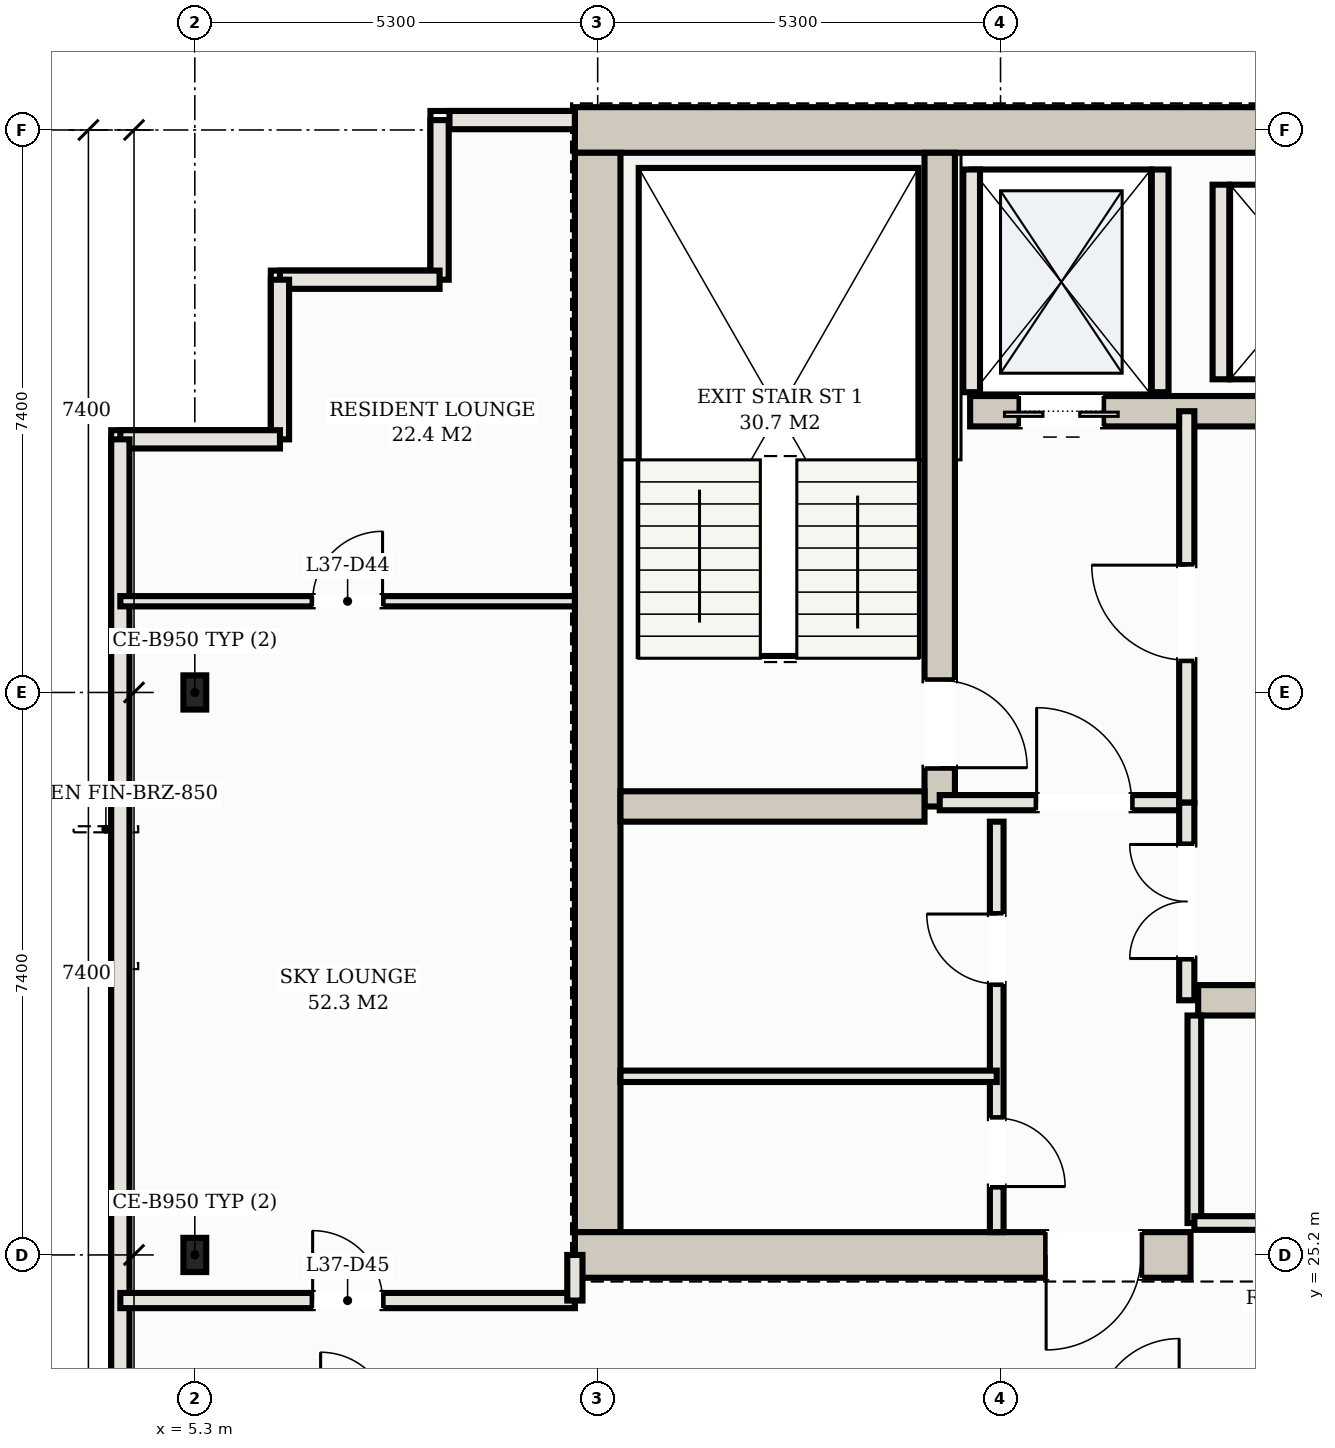
"""IFC4 building model, lengths in metres.
Left out: names, types, materials, properties, quantities, classifications, styles, units other than length and angle.
Written with IfcOpenShell. Run it as: python <this file> out.ifc"""

import sys

from ifc_helpers import new_model, si_unit, direction, frame, frame_2d, origin, origin_2d, place, context, subcontext, project, spatial, rectangle, hollow_rectangle, extrude, element, fill, save


model = new_model("IFC4")
c1 = context("Model", 3, precision=1e-05, world=origin(), true_north=direction((0.0, 1.0)))
c2 = subcontext(c1, "Body", "Model", "MODEL_VIEW")
j1 = project(units=[si_unit("LENGTHUNIT", "METRE"), si_unit("PLANEANGLEUNIT", "RADIAN")], contexts=[c1])
p1 = place(None, origin())
s1 = spatial("IfcSite", under=j1, at=p1, CompositionType="ELEMENT")
p2 = place(p1, origin())
s2 = spatial("IfcBuilding", under=s1, at=p2, CompositionType="ELEMENT")
p3 = place(p2, frame((0.0, 0.0, 139.2)))
s3 = spatial("IfcBuildingStorey", under=s2, at=p3, CompositionType="ELEMENT", Elevation=139.2)
p4 = place(p3, frame((10.3, 40.0, 0.0), z_axis=(0.0, 0.0, 1.0), x_axis=(1.0, 0.0, 0.0)))
e1 = element("IfcWall", 1, at=p4, inside=s3, PredefinedType="SHEAR", context=c2, shape_type="SweptSolid", body=[
    extrude(rectangle(XDim=32.4, YDim=0.6, at=frame_2d((16.2, 0.0))), origin(), (0.0, 0.0, 1.0), 3.1),
])
p5 = place(p3, frame((10.6, 25.5, 0.0), z_axis=(0.0, 0.0, 1.0), x_axis=(0.0, 1.0, 0.0)))
e2 = element("IfcWall", 2, at=p5, inside=s3, PredefinedType="SHEAR", context=c2, shape_type="SweptSolid", body=[
    extrude(rectangle(XDim=14.2, YDim=0.6, at=frame_2d((7.1, 0.0))), origin(), (0.0, 0.0, 1.0), 3.1),
])
p6 = place(p3, frame((10.3, 25.2, 0.0), z_axis=(0.0, 0.0, 1.0), x_axis=(1.0, 0.0, 0.0)))
e3 = element("IfcWall", 3, at=p6, inside=s3, PredefinedType="SHEAR", context=c2, shape_type="SweptSolid", body=[
    extrude(rectangle(XDim=8.1, YDim=0.6, at=frame_2d((4.05, 0.0))), origin(), (0.0, 0.0, 1.0), 3.1),
])
p7 = place(p6, frame((6.2, 0.0, 0.0)))
e4 = element("IfcOpeningElement", 4, at=p7, cuts=e3, PredefinedType="OPENING", context=c2, shape_type="SweptSolid", body=[
    extrude(rectangle(XDim=1.25, YDim=2.2, at=frame_2d((0.625, 1.1))), frame((0.0, 0.31, 0.0), z_axis=(0.0, -1.0, 0.0), x_axis=(1.0, 0.0, 0.0)), (0.0, 0.0, 1.0), 0.62),
])
p8 = place(p3, frame((15.1, 31.1, 0.0), z_axis=(0.0, 0.0, 1.0), x_axis=(0.0, 1.0, 0.0)))
e5 = element("IfcWall", 5, at=p8, inside=s3, PredefinedType="SHEAR", context=c2, shape_type="SweptSolid", body=[
    extrude(rectangle(XDim=8.6, YDim=0.4, at=frame_2d((4.3, 0.0))), origin(), (0.0, 0.0, 1.0), 3.1),
])
p9 = place(p8, frame((0.51, 0.0, 0.0)))
e6 = element("IfcOpeningElement", 6, at=p9, cuts=e5, PredefinedType="OPENING", context=c2, shape_type="SweptSolid", body=[
    extrude(rectangle(XDim=1.15, YDim=2.2, at=frame_2d((0.575, 1.1))), frame((0.0, 0.21, 0.0), z_axis=(0.0, -1.0, 0.0), x_axis=(1.0, 0.0, 0.0)), (0.0, 0.0, 1.0), 0.42),
])
p10 = place(p3, frame((10.9, 31.1, 0.0), z_axis=(0.0, 0.0, 1.0), x_axis=(1.0, 0.0, 0.0)))
e7 = element("IfcWall", 7, at=p10, inside=s3, PredefinedType="SHEAR", context=c2, shape_type="SweptSolid", body=[
    extrude(rectangle(XDim=4.0, YDim=0.4, at=frame_2d((2.0, 0.0))), origin(), (0.0, 0.0, 1.0), 3.1),
])
p11 = place(p3, frame((15.5, 36.3, 0.0), z_axis=(0.0, 0.0, 1.0), x_axis=(1.0, 0.0, 0.0)))
e8 = element("IfcWall", 8, at=p11, inside=s3, PredefinedType="SHEAR", context=c2, shape_type="SweptSolid", body=[
    extrude(rectangle(XDim=22.0, YDim=0.4, at=frame_2d((11.0, 0.0))), origin(), (0.0, 0.0, 1.0), 3.1),
])
p12 = place(p11, frame((0.65, 0.0, 0.0)))
e9 = element("IfcOpeningElement", 9, at=p12, cuts=e8, PredefinedType="OPENING", context=c2, shape_type="SweptSolid", body=[
    extrude(rectangle(XDim=1.1, YDim=2.15, at=frame_2d((0.55, 1.075))), frame((0.0, 0.21, 0.0), z_axis=(0.0, -1.0, 0.0), x_axis=(1.0, 0.0, 0.0)), (0.0, 0.0, 1.0), 0.42),
])
p13 = place(p11, frame((20.25, 0.0, 0.0)))
e10 = element("IfcOpeningElement", 10, at=p13, cuts=e8, PredefinedType="OPENING", context=c2, shape_type="SweptSolid", body=[
    extrude(rectangle(XDim=1.1, YDim=2.15, at=frame_2d((0.55, 1.075))), frame((0.0, 0.21, 0.0), z_axis=(0.0, -1.0, 0.0), x_axis=(1.0, 0.0, 0.0)), (0.0, 0.0, 1.0), 0.42),
])
p14 = place(p11, frame((17.05, 0.0, 0.0)))
e11 = element("IfcOpeningElement", 11, at=p14, cuts=e8, PredefinedType="OPENING", context=c2, shape_type="SweptSolid", body=[
    extrude(rectangle(XDim=1.3, YDim=2.2, at=frame_2d((0.65, 1.1))), frame((0.0, 0.21, 0.0), z_axis=(0.0, -1.0, 0.0), x_axis=(1.0, 0.0, 0.0)), (0.0, 0.0, 1.0), 0.42),
])
p15 = place(p3, frame((18.5, 28.55, 0.0), z_axis=(0.0, 0.0, 1.0), x_axis=(1.0, 0.0, 0.0)))
e12 = element("IfcWall", 12, at=p15, inside=s3, PredefinedType="SHEAR", context=c2, shape_type="SweptSolid", body=[
    extrude(rectangle(XDim=16.0, YDim=0.4, at=frame_2d((8.0, 0.0))), origin(), (0.0, 0.0, 1.0), 3.1),
])
p16 = place(p15, frame((8.95, 0.0, 0.0)))
e13 = element("IfcOpeningElement", 13, at=p16, cuts=e12, PredefinedType="OPENING", context=c2, shape_type="SweptSolid", body=[
    extrude(rectangle(XDim=1.1, YDim=2.15, at=frame_2d((0.55, 1.075))), frame((0.0, 0.21, 0.0), z_axis=(0.0, -1.0, 0.0), x_axis=(1.0, 0.0, 0.0)), (0.0, 0.0, 1.0), 0.42),
])
p17 = place(p15, frame((11.55, 0.0, 0.0)))
e14 = element("IfcOpeningElement", 14, at=p17, cuts=e12, PredefinedType="OPENING", context=c2, shape_type="SweptSolid", body=[
    extrude(rectangle(XDim=1.1, YDim=2.15, at=frame_2d((0.55, 1.075))), frame((0.0, 0.21, 0.0), z_axis=(0.0, -1.0, 0.0), x_axis=(1.0, 0.0, 0.0)), (0.0, 0.0, 1.0), 0.42),
])
p18 = place(p15, frame((14.15, 0.0, 0.0)))
e15 = element("IfcOpeningElement", 15, at=p18, cuts=e12, PredefinedType="OPENING", context=c2, shape_type="SweptSolid", body=[
    extrude(rectangle(XDim=1.1, YDim=2.15, at=frame_2d((0.55, 1.075))), frame((0.0, 0.21, 0.0), z_axis=(0.0, -1.0, 0.0), x_axis=(1.0, 0.0, 0.0)), (0.0, 0.0, 1.0), 0.42),
])
for number, where, z_axis, x_axis in (
    (16, (5.3, 25.2, 0.0), (0.0, 0.0, 1.0), (1.0, 0.0, 0.0)),
    (17, (5.3, 32.6, 0.0), (0.0, 0.0, 1.0), (1.0, 0.0, 0.0)),
):
    element("IfcColumn", number, at=place(p3, frame(where, z_axis=z_axis, x_axis=x_axis)), inside=s3, PredefinedType="COLUMN", context=c2, shape_type="SweptSolid", body=[
        extrude(hollow_rectangle(XDim=0.3, YDim=0.45, WallThickness=0.016, at=origin_2d()), origin(), (0.0, 0.0, 1.0), 3.3),
    ])
for number, where, z_axis, x_axis in (
    (18, (15.52, 36.55, 0.0), (0.0, 0.0, 1.0), (0.0, 1.0, 0.0)),
    (19, (18.0, 36.55, 0.0), (0.0, 0.0, 1.0), (0.0, 1.0, 0.0)),
):
    element("IfcWall", number, at=place(p3, frame(where, z_axis=z_axis, x_axis=x_axis)), inside=s3, PredefinedType="SOLIDWALL", context=c2, shape_type="SweptSolid", body=[
        extrude(rectangle(XDim=2.93, YDim=0.22, at=frame_2d((1.465, 0.0))), origin(), (0.0, 0.0, 1.0), 3.1),
    ])
p19 = place(p3, frame((18.8, 36.72, 0.0), z_axis=(0.0, 0.0, 1.0), x_axis=(0.0, 1.0, 0.0)))
e20 = element("IfcWall", 20, at=p19, inside=s3, PredefinedType="SOLIDWALL", context=c2, shape_type="SweptSolid", body=[
    extrude(rectangle(XDim=2.56, YDim=0.22, at=frame_2d((1.28, 0.0))), origin(), (0.0, 0.0, 1.0), 3.1),
])
p20 = place(p3, frame((10.3, 40.13, 0.0), z_axis=(0.0, 0.0, 1.0), x_axis=(-1.0, 0.0, 0.0)))
e21 = element("IfcWall", 21, at=p20, inside=s3, PredefinedType="SOLIDWALL", context=c2, shape_type="SweptSolid", body=[
    extrude(rectangle(XDim=1.65, YDim=0.24, at=frame_2d((0.825, 0.0))), origin(), (0.0, 0.0, 1.0), 3.1),
])
p21 = place(p3, frame((8.52, 40.13, 0.0), z_axis=(0.0, 0.0, 1.0), x_axis=(0.0, -1.0, 0.0)))
e22 = element("IfcWall", 22, at=p21, inside=s3, PredefinedType="SOLIDWALL", context=c2, shape_type="SweptSolid", body=[
    extrude(rectangle(XDim=2.1, YDim=0.24, at=frame_2d((1.05, 0.0))), origin(), (0.0, 0.0, 1.0), 3.1),
])
for number, where, z_axis, x_axis in (
    (23, (8.52, 38.03, 0.0), (0.0, 0.0, 1.0), (-1.0, 0.0, 0.0)),
    (24, (6.42, 38.03, 0.0), (0.0, 0.0, 1.0), (0.0, -1.0, 0.0)),
):
    element("IfcWall", number, at=place(p3, frame(where, z_axis=z_axis, x_axis=x_axis)), inside=s3, PredefinedType="SOLIDWALL", context=c2, shape_type="SweptSolid", body=[
        extrude(rectangle(XDim=2.1, YDim=0.24, at=frame_2d((1.05, 0.0))), origin(), (0.0, 0.0, 1.0), 3.1),
    ])
p22 = place(p3, frame((6.42, 35.93, 0.0), z_axis=(0.0, 0.0, 1.0), x_axis=(-1.0, 0.0, 0.0)))
e25 = element("IfcWall", 25, at=p22, inside=s3, PredefinedType="SOLIDWALL", context=c2, shape_type="SweptSolid", body=[
    extrude(rectangle(XDim=2.1, YDim=0.24, at=frame_2d((1.05, 0.0))), origin(), (0.0, 0.0, 1.0), 3.1),
])
p23 = place(p3, frame((4.32, 35.93, 0.0), z_axis=(0.0, 0.0, 1.0), x_axis=(0.0, -1.0, 0.0)))
e26 = element("IfcWall", 26, at=p23, inside=s3, PredefinedType="SOLIDWALL", context=c2, shape_type="SweptSolid", body=[
    extrude(rectangle(XDim=27.41, YDim=0.24, at=frame_2d((13.705, 0.0))), origin(), (0.0, 0.0, 1.0), 3.1),
])
p24 = place(p3, frame((15.1, 31.15, 0.0), z_axis=(0.0, 0.0, 1.0), x_axis=(1.0, 0.0, 0.0)))
e27 = element("IfcWall", 27, at=p24, inside=s3, PredefinedType="PARTITIONING", context=c2, shape_type="SweptSolid", body=[
    extrude(rectangle(XDim=3.25, YDim=0.2, at=frame_2d((1.625, 0.0))), origin(), (0.0, 0.0, 1.0), 2.38),
])
p25 = place(p24, frame((1.275, 0.0, 0.0)))
e28 = element("IfcOpeningElement", 28, at=p25, cuts=e27, PredefinedType="OPENING", context=c2, shape_type="SweptSolid", body=[
    extrude(rectangle(XDim=1.25, YDim=2.2, at=frame_2d((0.625, 1.1))), frame((0.0, 0.11, 0.0), z_axis=(0.0, -1.0, 0.0), x_axis=(1.0, 0.0, 0.0)), (0.0, 0.0, 1.0), 0.22),
])
p26 = place(p3, frame((18.35, 31.15, 0.0), z_axis=(0.0, 0.0, 1.0), x_axis=(0.0, 1.0, 0.0)))
e29 = element("IfcWall", 29, at=p26, inside=s3, PredefinedType="PARTITIONING", context=c2, shape_type="SweptSolid", body=[
    extrude(rectangle(XDim=5.15, YDim=0.2, at=frame_2d((2.575, 0.0))), origin(), (0.0, 0.0, 1.0), 2.38),
])
p27 = place(p26, frame((1.875, 0.0, 0.0)))
e30 = element("IfcOpeningElement", 30, at=p27, cuts=e29, PredefinedType="OPENING", context=c2, shape_type="SweptSolid", body=[
    extrude(rectangle(XDim=1.25, YDim=2.2, at=frame_2d((0.625, 1.1))), frame((0.0, 0.11, 0.0), z_axis=(0.0, -1.0, 0.0), x_axis=(1.0, 0.0, 0.0)), (0.0, 0.0, 1.0), 0.22),
])
p28 = place(p3, frame((15.85, 25.5, 0.0), z_axis=(0.0, 0.0, 1.0), x_axis=(0.0, 1.0, 0.0)))
e31 = element("IfcWall", 31, at=p28, inside=s3, PredefinedType="PARTITIONING", context=c2, shape_type="SweptSolid", body=[
    extrude(rectangle(XDim=5.4, YDim=0.18, at=frame_2d((2.7, 0.0))), origin(), (0.0, 0.0, 1.0), 2.38),
])
p29 = place(p28, frame((0.6, 0.0, 0.0)))
e32 = element("IfcOpeningElement", 32, at=p29, cuts=e31, PredefinedType="OPENING", context=c2, shape_type="SweptSolid", body=[
    extrude(rectangle(XDim=0.9, YDim=2.15, at=frame_2d((0.45, 1.075))), frame((0.0, 0.1, 0.0), z_axis=(0.0, -1.0, 0.0), x_axis=(1.0, 0.0, 0.0)), (0.0, 0.0, 1.0), 0.2),
])
p30 = place(p28, frame((3.265, 0.0, 0.0)))
e33 = element("IfcOpeningElement", 33, at=p30, cuts=e31, PredefinedType="OPENING", context=c2, shape_type="SweptSolid", body=[
    extrude(rectangle(XDim=0.92, YDim=2.15, at=frame_2d((0.46, 1.075))), frame((0.0, 0.1, 0.0), z_axis=(0.0, -1.0, 0.0), x_axis=(1.0, 0.0, 0.0)), (0.0, 0.0, 1.0), 0.2),
])
p31 = place(p3, frame((10.9, 27.55, 0.0), z_axis=(0.0, 0.0, 1.0), x_axis=(1.0, 0.0, 0.0)))
e34 = element("IfcWall", 34, at=p31, inside=s3, PredefinedType="PARTITIONING", context=c2, shape_type="SweptSolid", body=[
    extrude(rectangle(XDim=4.95, YDim=0.15, at=frame_2d((2.475, 0.0))), origin(), (0.0, 0.0, 1.0), 2.38),
])
p32 = place(p3, frame((18.35, 28.55, 0.0), z_axis=(0.0, 0.0, 1.0), x_axis=(0.0, 1.0, 0.0)))
e35 = element("IfcWall", 35, at=p32, inside=s3, PredefinedType="PARTITIONING", context=c2, shape_type="SweptSolid", body=[
    extrude(rectangle(XDim=2.6, YDim=0.2, at=frame_2d((1.3, 0.0))), origin(), (0.0, 0.0, 1.0), 2.38),
])
p33 = place(p32, frame((0.55, 0.0, 0.0)))
e36 = element("IfcOpeningElement", 36, at=p33, cuts=e35, PredefinedType="OPENING", context=c2, shape_type="SweptSolid", body=[
    extrude(rectangle(XDim=1.5, YDim=2.25, at=frame_2d((0.75, 1.125))), frame((0.0, 0.11, 0.0), z_axis=(0.0, -1.0, 0.0), x_axis=(1.0, 0.0, 0.0)), (0.0, 0.0, 1.0), 0.22),
])
p34 = place(p3, frame((18.45, 25.62, 0.0), z_axis=(0.0, 0.0, 1.0), x_axis=(0.0, 1.0, 0.0)))
e37 = element("IfcWall", 37, at=p34, inside=s3, PredefinedType="PARTITIONING", context=c2, shape_type="SweptSolid", body=[
    extrude(rectangle(XDim=2.73, YDim=0.18, at=frame_2d((1.365, 0.0))), origin(), (0.0, 0.0, 1.0), 2.38),
])
p35 = place(p3, frame((18.45, 25.62, 0.0), z_axis=(0.0, 0.0, 1.0), x_axis=(1.0, 0.0, 0.0)))
e38 = element("IfcWall", 38, at=p35, inside=s3, PredefinedType="PARTITIONING", context=c2, shape_type="SweptSolid", body=[
    extrude(rectangle(XDim=7.9, YDim=0.18, at=frame_2d((3.95, 0.0))), origin(), (0.0, 0.0, 1.0), 2.38),
])
p36 = place(p35, frame((3.34, 0.0, 0.0)))
e39 = element("IfcOpeningElement", 39, at=p36, cuts=e38, PredefinedType="OPENING", context=c2, shape_type="SweptSolid", body=[
    extrude(rectangle(XDim=0.92, YDim=2.15, at=frame_2d((0.46, 1.075))), frame((0.0, 0.1, 0.0), z_axis=(0.0, -1.0, 0.0), x_axis=(1.0, 0.0, 0.0)), (0.0, 0.0, 1.0), 0.2),
])
p37 = place(p3, frame((4.32, 24.6, 0.0), z_axis=(0.0, 0.0, 1.0), x_axis=(1.0, 0.0, 0.0)))
e40 = element("IfcWall", 40, at=p37, inside=s3, PredefinedType="PARTITIONING", context=c2, shape_type="SweptSolid", body=[
    extrude(rectangle(XDim=5.98, YDim=0.2, at=frame_2d((2.99, 0.0))), origin(), (0.0, 0.0, 1.0), 2.38),
])
p38 = place(p37, frame((2.53, 0.0, 0.0)))
e41 = element("IfcOpeningElement", 41, at=p38, cuts=e40, PredefinedType="OPENING", context=c2, shape_type="SweptSolid", body=[
    extrude(rectangle(XDim=0.92, YDim=2.15, at=frame_2d((0.46, 1.075))), frame((0.0, 0.11, 0.0), z_axis=(0.0, -1.0, 0.0), x_axis=(1.0, 0.0, 0.0)), (0.0, 0.0, 1.0), 0.22),
])
p39 = place(p3, frame((10.3, 24.6, 0.0), z_axis=(0.0, 0.0, 1.0), x_axis=(0.0, 1.0, 0.0)))
e42 = element("IfcWall", 42, at=p39, inside=s3, PredefinedType="PARTITIONING", context=c2, shape_type="SweptSolid", body=[
    extrude(rectangle(XDim=0.6, YDim=0.2, at=frame_2d((0.3, 0.0))), origin(), (0.0, 0.0, 1.0), 2.38),
])
p40 = place(p3, frame((4.32, 33.8, 0.0), z_axis=(0.0, 0.0, 1.0), x_axis=(1.0, 0.0, 0.0)))
e43 = element("IfcWall", 43, at=p40, inside=s3, PredefinedType="PARTITIONING", context=c2, shape_type="SweptSolid", body=[
    extrude(rectangle(XDim=5.98, YDim=0.135, at=frame_2d((2.99, 0.0))), origin(), (0.0, 0.0, 1.0), 2.38),
])
p41 = place(p40, frame((2.53, 0.0, 0.0)))
e44 = element("IfcOpeningElement", 44, at=p41, cuts=e43, PredefinedType="OPENING", context=c2, shape_type="SweptSolid", body=[
    extrude(rectangle(XDim=0.92, YDim=2.15, at=frame_2d((0.46, 1.075))), frame((0.0, 0.078, 0.0), z_axis=(0.0, -1.0, 0.0), x_axis=(1.0, 0.0, 0.0)), (0.0, 0.0, 1.0), 0.155),
])
p42 = place(p12, frame((1.1, 0.0, 0.0), z_axis=(0.0, 0.0, 1.0), x_axis=(-1.0, 0.0, 0.0)))
e45 = element("IfcDoor", 45, at=p42, inside=s3, OperationType="DOUBLE_DOOR_SLIDING", PredefinedType="DOOR", context=c2, shape_type="SweptSolid", body=[
    extrude(rectangle(XDim=1.1, YDim=2.15, at=frame_2d((0.55, 1.075))), frame((0.0, 0.025, 0.0), z_axis=(0.0, -1.0, 0.0), x_axis=(1.0, 0.0, 0.0)), (0.0, 0.0, 1.0), 0.05),
])
fill(e9, e45)
p43 = place(p7, frame((1.25, 0.0, 0.0), z_axis=(0.0, 0.0, 1.0), x_axis=(-1.0, 0.0, 0.0)))
e46 = element("IfcDoor", 46, at=p43, inside=s3, OperationType="SINGLE_SWING_RIGHT", PredefinedType="DOOR", context=c2, shape_type="SweptSolid", body=[
    extrude(rectangle(XDim=1.25, YDim=2.2, at=frame_2d((0.625, 1.1))), frame((0.0, 0.025, 0.0), z_axis=(0.0, -1.0, 0.0), x_axis=(1.0, 0.0, 0.0)), (0.0, 0.0, 1.0), 0.05),
])
fill(e4, e46)
p44 = place(p25, origin())
e47 = element("IfcDoor", 47, at=p44, inside=s3, OperationType="SINGLE_SWING_LEFT", PredefinedType="DOOR", context=c2, shape_type="SweptSolid", body=[
    extrude(rectangle(XDim=1.25, YDim=2.2, at=frame_2d((0.625, 1.1))), frame((0.0, 0.025, 0.0), z_axis=(0.0, -1.0, 0.0), x_axis=(1.0, 0.0, 0.0)), (0.0, 0.0, 1.0), 0.05),
])
fill(e28, e47)
p45 = place(p27, origin())
e48 = element("IfcDoor", 48, at=p45, inside=s3, OperationType="SINGLE_SWING_RIGHT", PredefinedType="DOOR", context=c2, shape_type="SweptSolid", body=[
    extrude(rectangle(XDim=1.25, YDim=2.2, at=frame_2d((0.625, 1.1))), frame((0.0, 0.025, 0.0), z_axis=(0.0, -1.0, 0.0), x_axis=(1.0, 0.0, 0.0)), (0.0, 0.0, 1.0), 0.05),
])
fill(e30, e48)
p46 = place(p9, frame((1.15, 0.0, 0.0), z_axis=(0.0, 0.0, 1.0), x_axis=(-1.0, 0.0, 0.0)))
e49 = element("IfcDoor", 49, at=p46, inside=s3, OperationType="SINGLE_SWING_RIGHT", PredefinedType="DOOR", context=c2, shape_type="SweptSolid", body=[
    extrude(rectangle(XDim=1.15, YDim=2.2, at=frame_2d((0.575, 1.1))), frame((0.0, 0.025, 0.0), z_axis=(0.0, -1.0, 0.0), x_axis=(1.0, 0.0, 0.0)), (0.0, 0.0, 1.0), 0.05),
])
fill(e6, e49)
p47 = place(p29, frame((0.9, 0.0, 0.0), z_axis=(0.0, 0.0, 1.0), x_axis=(-1.0, 0.0, 0.0)))
e50 = element("IfcDoor", 50, at=p47, inside=s3, OperationType="SINGLE_SWING_RIGHT", PredefinedType="DOOR", context=c2, shape_type="SweptSolid", body=[
    extrude(rectangle(XDim=0.9, YDim=2.15, at=frame_2d((0.45, 1.075))), frame((0.0, 0.025, 0.0), z_axis=(0.0, -1.0, 0.0), x_axis=(1.0, 0.0, 0.0)), (0.0, 0.0, 1.0), 0.05),
])
fill(e32, e50)
p48 = place(p30, origin())
e51 = element("IfcDoor", 51, at=p48, inside=s3, OperationType="SINGLE_SWING_RIGHT", PredefinedType="DOOR", context=c2, shape_type="SweptSolid", body=[
    extrude(rectangle(XDim=0.92, YDim=2.15, at=frame_2d((0.46, 1.075))), frame((0.0, 0.025, 0.0), z_axis=(0.0, -1.0, 0.0), x_axis=(1.0, 0.0, 0.0)), (0.0, 0.0, 1.0), 0.05),
])
fill(e33, e51)
p49 = place(p33, origin())
e52 = element("IfcDoor", 52, at=p49, inside=s3, OperationType="DOUBLE_DOOR_SINGLE_SWING", PredefinedType="DOOR", context=c2, shape_type="SweptSolid", body=[
    extrude(rectangle(XDim=1.5, YDim=2.25, at=frame_2d((0.75, 1.125))), frame((0.0, 0.025, 0.0), z_axis=(0.0, -1.0, 0.0), x_axis=(1.0, 0.0, 0.0)), (0.0, 0.0, 1.0), 0.05),
])
fill(e36, e52)
p50 = place(p41, origin())
e53 = element("IfcDoor", 53, at=p50, inside=s3, OperationType="SINGLE_SWING_RIGHT", PredefinedType="DOOR", context=c2, shape_type="SweptSolid", body=[
    extrude(rectangle(XDim=0.92, YDim=2.15, at=frame_2d((0.46, 1.075))), frame((0.0, 0.025, 0.0), z_axis=(0.0, -1.0, 0.0), x_axis=(1.0, 0.0, 0.0)), (0.0, 0.0, 1.0), 0.05),
])
fill(e44, e53)
p51 = place(p38, origin())
e54 = element("IfcDoor", 54, at=p51, inside=s3, OperationType="SINGLE_SWING_LEFT", PredefinedType="DOOR", context=c2, shape_type="SweptSolid", body=[
    extrude(rectangle(XDim=0.92, YDim=2.15, at=frame_2d((0.46, 1.075))), frame((0.0, 0.025, 0.0), z_axis=(0.0, -1.0, 0.0), x_axis=(1.0, 0.0, 0.0)), (0.0, 0.0, 1.0), 0.05),
])
fill(e41, e54)
save(model, sys.argv[1])
